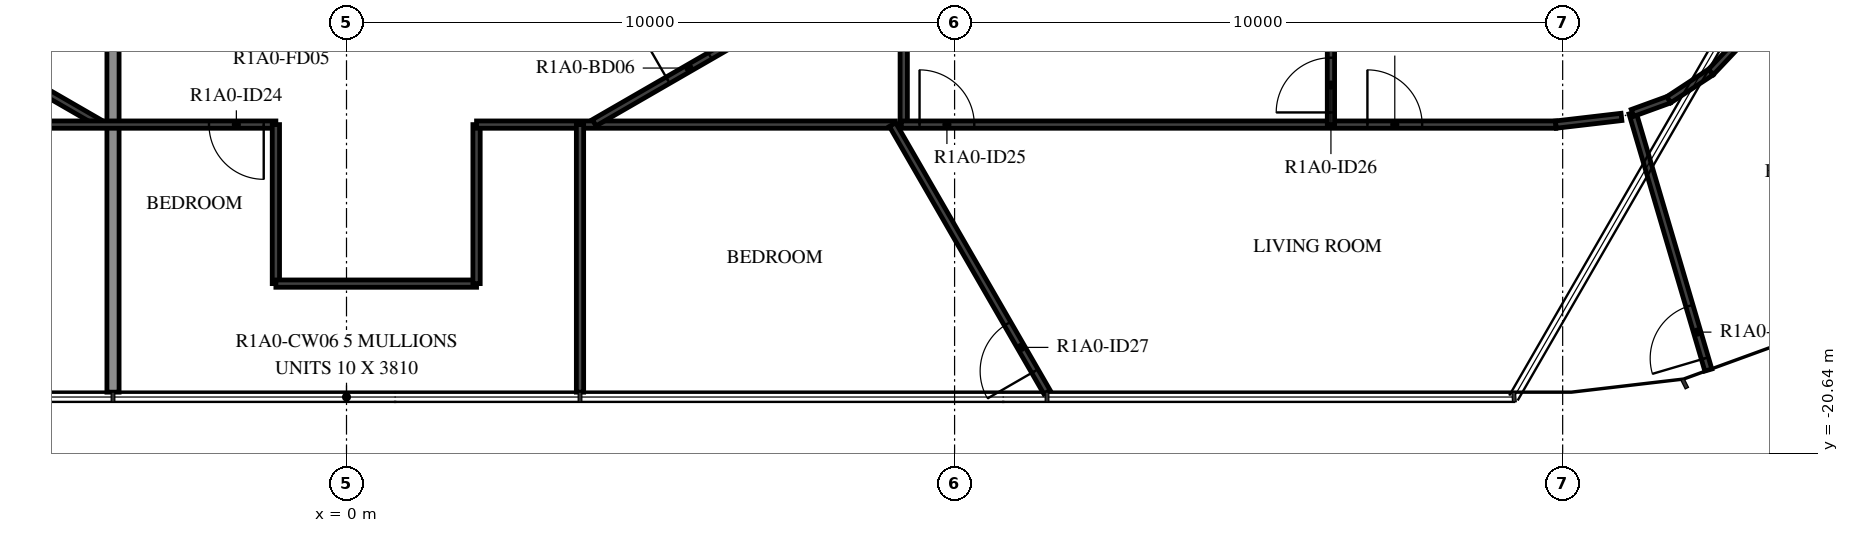
"""IFC4 building model, lengths in metres.
Left out: names, types, materials, properties, quantities, classifications, styles, units other than length and angle.
Written with IfcOpenShell. Run it as: python <this file> out.ifc"""

import sys

from ifc_helpers import new_model, si_unit, direction, frame, frame_2d, origin, place, context, subcontext, project, spatial, rectangle, extrude, element, fill, save


model = new_model("IFC4")
c1 = context("Model", 3, precision=1e-05, world=origin(), true_north=direction((0.0, 1.0)))
c2 = subcontext(c1, "Body", "Model", "MODEL_VIEW")
j1 = project(units=[si_unit("LENGTHUNIT", "METRE"), si_unit("PLANEANGLEUNIT", "RADIAN")], contexts=[c1])
p1 = place(None, origin())
s1 = spatial("IfcSite", under=j1, at=p1, CompositionType="ELEMENT")
p2 = place(p1, origin())
s2 = spatial("IfcBuilding", under=s1, at=p2, CompositionType="ELEMENT")
p3 = place(p2, frame((0.0, 0.0, 38.4)))
s3 = spatial("IfcBuildingStorey", under=s2, at=p3, CompositionType="ELEMENT", Elevation=38.4)
p4 = place(p3, frame((-3.84, -19.63, 0.0), z_axis=(0.0, 0.0, 1.0), x_axis=(0.0, 1.0, 0.0)))
e1 = element("IfcWall", 1, at=p4, inside=s3, PredefinedType="STANDARD", context=c2, shape_type="SweptSolid", body=[
    extrude(rectangle(XDim=6.028, YDim=0.2, at=frame_2d((3.014, 0.0))), origin(), (0.0, 0.0, 1.0), 2.73),
])
p5 = place(p3, frame((27.025, -15.603, 0.0), z_axis=(0.0, 0.0, 1.0), x_axis=(-0.866030653443, 0.499990907215, 0.0)))
e2 = element("IfcWall", 2, at=p5, inside=s3, PredefinedType="STANDARD", context=c2, shape_type="SweptSolid", body=[
    extrude(rectangle(XDim=6.271, YDim=0.2, at=frame_2d((3.136, 0.0))), origin(), (0.0, 0.0, 1.0), 3.12),
])
p6 = place(p3, frame((-11.127, -11.127, 0.0), z_axis=(0.0, 0.0, 1.0), x_axis=(0.866032360344, -0.499987950692, 0.0)))
e3 = element("IfcWall", 3, at=p6, inside=s3, PredefinedType="PARTITIONING", context=c2, shape_type="SweptSolid", body=[
    extrude(rectangle(XDim=8.146, YDim=0.12, at=frame_2d((4.073, 0.0))), origin(), (0.0, 0.0, 1.0), 3.12),
])
p7 = place(p6, frame((1.357, 0.0, 0.0)))
e4 = element("IfcOpeningElement", 4, at=p7, cuts=e3, PredefinedType="OPENING", context=c2, shape_type="SweptSolid", body=[
    extrude(rectangle(XDim=0.8, YDim=2.1, at=frame_2d((0.4, 1.05))), frame((0.0, 0.07, 0.0), z_axis=(0.0, -1.0, 0.0), x_axis=(1.0, 0.0, 0.0)), (0.0, 0.0, 1.0), 0.14),
])
p8 = place(p3, frame((-1.161, -15.23, 0.0), z_axis=(0.0, 0.0, 1.0), x_axis=(-1.0, 0.0, 0.0)))
e5 = element("IfcWall", 5, at=p8, inside=s3, PredefinedType="PARTITIONING", context=c2, shape_type="SweptSolid", body=[
    extrude(rectangle(XDim=18.726, YDim=0.12, at=frame_2d((9.363, 0.0))), origin(), (0.0, 0.0, 1.0), 3.12),
])
p9 = place(p8, frame((9.297, 0.0, 0.0)))
e6 = element("IfcOpeningElement", 6, at=p9, cuts=e5, PredefinedType="OPENING", context=c2, shape_type="SweptSolid", body=[
    extrude(rectangle(XDim=0.9, YDim=2.1, at=frame_2d((0.45, 1.05))), frame((0.0, 0.07, 0.0), z_axis=(0.0, -1.0, 0.0), x_axis=(1.0, 0.0, 0.0)), (0.0, 0.0, 1.0), 0.14),
])
p10 = place(p8, frame((15.755, 0.0, 0.0)))
e7 = element("IfcOpeningElement", 7, at=p10, cuts=e5, PredefinedType="OPENING", context=c2, shape_type="SweptSolid", body=[
    extrude(rectangle(XDim=0.9, YDim=2.1, at=frame_2d((0.45, 1.05))), frame((0.0, 0.07, 0.0), z_axis=(0.0, -1.0, 0.0), x_axis=(1.0, 0.0, 0.0)), (0.0, 0.0, 1.0), 0.14),
])
p11 = place(p8, frame((0.2, 0.0, 0.0)))
e8 = element("IfcOpeningElement", 8, at=p11, cuts=e5, PredefinedType="OPENING", context=c2, shape_type="SweptSolid", body=[
    extrude(rectangle(XDim=0.9, YDim=2.1, at=frame_2d((0.45, 1.05))), frame((0.0, 0.07, 0.0), z_axis=(0.0, -1.0, 0.0), x_axis=(1.0, 0.0, 0.0)), (0.0, 0.0, 1.0), 0.14),
])
p12 = place(p3, frame((-1.161, -15.23, 0.0), z_axis=(0.0, 0.0, 1.0), x_axis=(0.0, -1.0, 0.0)))
e9 = element("IfcWall", 9, at=p12, inside=s3, PredefinedType="PARTITIONING", context=c2, shape_type="SweptSolid", body=[
    extrude(rectangle(XDim=2.615, YDim=0.12, at=frame_2d((1.308, 0.0))), origin(), (0.0, 0.0, 1.0), 3.12),
])
p13 = place(p3, frame((-1.161, -17.845, 0.0), z_axis=(0.0, 0.0, 1.0), x_axis=(1.0, 0.0, 0.0)))
e10 = element("IfcWall", 10, at=p13, inside=s3, PredefinedType="PARTITIONING", context=c2, shape_type="SweptSolid", body=[
    extrude(rectangle(XDim=3.3, YDim=0.12, at=frame_2d((1.65, 0.0))), origin(), (0.0, 0.0, 1.0), 3.12),
])
p14 = place(p3, frame((2.139, -17.845, 0.0), z_axis=(0.0, 0.0, 1.0), x_axis=(0.0, 1.0, 0.0)))
e11 = element("IfcWall", 11, at=p14, inside=s3, PredefinedType="PARTITIONING", context=c2, shape_type="SweptSolid", body=[
    extrude(rectangle(XDim=2.615, YDim=0.12, at=frame_2d((1.308, 0.0))), origin(), (0.0, 0.0, 1.0), 3.12),
])
p15 = place(p3, frame((2.139, -15.23, 0.0), z_axis=(0.0, 0.0, 1.0), x_axis=(1.0, 0.0, 0.0)))
e12 = element("IfcWall", 12, at=p15, inside=s3, PredefinedType="PARTITIONING", context=c2, shape_type="SweptSolid", body=[
    extrude(rectangle(XDim=6.887, YDim=0.12, at=frame_2d((3.444, 0.0))), origin(), (0.0, 0.0, 1.0), 3.12),
])
p16 = place(p3, frame((4.073, -15.2, 0.0), z_axis=(0.0, 0.0, 1.0), x_axis=(0.866034128446, 0.499984888139, 0.0)))
e13 = element("IfcWall", 13, at=p16, inside=s3, PredefinedType="PARTITIONING", context=c2, shape_type="SweptSolid", body=[
    extrude(rectangle(XDim=5.879, YDim=0.12, at=frame_2d((2.939, 0.0))), origin(), (0.0, 0.0, 1.0), 3.12),
])
p17 = place(p16, frame((1.4, 0.0, 0.0)))
e14 = element("IfcOpeningElement", 14, at=p17, cuts=e13, PredefinedType="OPENING", context=c2, shape_type="SweptSolid", body=[
    extrude(rectangle(XDim=0.8, YDim=2.1, at=frame_2d((0.4, 1.05))), frame((0.0, 0.07, 0.0), z_axis=(0.0, -1.0, 0.0), x_axis=(1.0, 0.0, 0.0)), (0.0, 0.0, 1.0), 0.14),
])
p18 = place(p3, frame((9.164, -12.261, 0.0), z_axis=(0.0, 0.0, 1.0), x_axis=(0.0, -1.0, 0.0)))
e15 = element("IfcWall", 15, at=p18, inside=s3, PredefinedType="PARTITIONING", context=c2, shape_type="SweptSolid", body=[
    extrude(rectangle(XDim=2.969, YDim=0.12, at=frame_2d((1.485, 0.0))), origin(), (0.0, 0.0, 1.0), 3.12),
])
p19 = place(p3, frame((9.124, -15.23, 0.0), z_axis=(0.0, 0.0, 1.0), x_axis=(1.0, 0.0, 0.0)))
e16 = element("IfcWall", 16, at=p19, inside=s3, PredefinedType="PARTITIONING", context=c2, shape_type="SweptSolid", body=[
    extrude(rectangle(XDim=10.764, YDim=0.12, at=frame_2d((5.382, 0.0))), origin(), (0.0, 0.0, 1.0), 3.12),
])
p20 = place(p19, frame((0.3, 0.0, 0.0)))
e17 = element("IfcOpeningElement", 17, at=p20, cuts=e16, PredefinedType="OPENING", context=c2, shape_type="SweptSolid", body=[
    extrude(rectangle(XDim=0.9, YDim=2.1, at=frame_2d((0.45, 1.05))), frame((0.0, 0.07, 0.0), z_axis=(0.0, -1.0, 0.0), x_axis=(1.0, 0.0, 0.0)), (0.0, 0.0, 1.0), 0.14),
])
p21 = place(p19, frame((7.665, 0.0, 0.0)))
e18 = element("IfcOpeningElement", 18, at=p21, cuts=e16, PredefinedType="OPENING", context=c2, shape_type="SweptSolid", body=[
    extrude(rectangle(XDim=0.9, YDim=2.1, at=frame_2d((0.45, 1.05))), frame((0.0, 0.07, 0.0), z_axis=(0.0, -1.0, 0.0), x_axis=(1.0, 0.0, 0.0)), (0.0, 0.0, 1.0), 0.14),
])
p22 = place(p3, frame((16.189, -15.23, 0.0), z_axis=(0.0, 0.0, 1.0), x_axis=(0.0, 1.0, 0.0)))
e19 = element("IfcWall", 19, at=p22, inside=s3, PredefinedType="PARTITIONING", context=c2, shape_type="SweptSolid", body=[
    extrude(rectangle(XDim=5.883, YDim=0.12, at=frame_2d((2.942, 0.0))), origin(), (0.0, 0.0, 1.0), 3.12),
])
p23 = place(p22, frame((0.2, 0.0, 0.0)))
e20 = element("IfcOpeningElement", 20, at=p23, cuts=e19, PredefinedType="OPENING", context=c2, shape_type="SweptSolid", body=[
    extrude(rectangle(XDim=0.9, YDim=2.1, at=frame_2d((0.45, 1.05))), frame((0.0, 0.07, 0.0), z_axis=(0.0, -1.0, 0.0), x_axis=(1.0, 0.0, 0.0)), (0.0, 0.0, 1.0), 0.14),
])
p24 = place(p3, frame((3.84, -19.63, 0.0), z_axis=(0.0, 0.0, 1.0), x_axis=(0.0, 1.0, 0.0)))
e21 = element("IfcWall", 21, at=p24, inside=s3, PredefinedType="PARTITIONING", context=c2, shape_type="SweptSolid", body=[
    extrude(rectangle(XDim=4.4, YDim=0.12, at=frame_2d((2.2, 0.0))), origin(), (0.0, 0.0, 1.0), 2.73),
])
p25 = place(p3, frame((11.52, -19.63, 0.0), z_axis=(0.0, 0.0, 1.0), x_axis=(-0.499999763888, 0.866025540104, 0.0)))
e22 = element("IfcWall", 22, at=p25, inside=s3, PredefinedType="PARTITIONING", context=c2, shape_type="SweptSolid", body=[
    extrude(rectangle(XDim=5.081, YDim=0.12, at=frame_2d((2.54, 0.0))), origin(), (0.0, 0.0, 1.0), 3.12),
])
p26 = place(p25, frame((0.4, 0.0, 0.0)))
e23 = element("IfcOpeningElement", 23, at=p26, cuts=e22, PredefinedType="OPENING", context=c2, shape_type="SweptSolid", body=[
    extrude(rectangle(XDim=0.9, YDim=2.1, at=frame_2d((0.45, 1.05))), frame((0.0, 0.07, 0.0), z_axis=(0.0, -1.0, 0.0), x_axis=(1.0, 0.0, 0.0)), (0.0, 0.0, 1.0), 0.14),
])
p27 = place(p3, frame((20.967, -15.104, 0.0), z_axis=(0.0, 0.0, 1.0), x_axis=(-0.993231641151, -0.116150363826, 0.0)))
e24 = element("IfcWall", 24, at=p27, inside=s3, PredefinedType="PARTITIONING", context=c2, shape_type="SweptSolid", body=[
    extrude(rectangle(XDim=1.087, YDim=0.12, at=frame_2d((0.543, 0.0))), origin(), (0.0, 0.0, 1.0), 3.12),
])
p28 = place(p3, frame((22.396, -19.266, 0.0), z_axis=(0.0, 0.0, 1.0), x_axis=(-0.282873823334, 0.959157130022, 0.0)))
e25 = element("IfcWall", 25, at=p28, inside=s3, PredefinedType="PARTITIONING", context=c2, shape_type="SweptSolid", body=[
    extrude(rectangle(XDim=4.409, YDim=0.12, at=frame_2d((2.204, 0.0))), origin(), (0.0, 0.0, 1.0), 3.12),
])
p29 = place(p28, frame((0.2, 0.0, 0.0)))
e26 = element("IfcOpeningElement", 26, at=p29, cuts=e25, PredefinedType="OPENING", context=c2, shape_type="SweptSolid", body=[
    extrude(rectangle(XDim=0.9, YDim=2.1, at=frame_2d((0.45, 1.05))), frame((0.0, 0.07, 0.0), z_axis=(0.0, -1.0, 0.0), x_axis=(1.0, 0.0, 0.0)), (0.0, 0.0, 1.0), 0.14),
])
p30 = place(p3, frame((21.149, -15.038, 0.0), z_axis=(0.0, 0.0, 1.0), x_axis=(0.939726102094, 0.341928140173, 0.0)))
e27 = element("IfcWall", 27, at=p30, inside=s3, PredefinedType="PARTITIONING", context=c2, shape_type="SweptSolid", body=[
    extrude(rectangle(XDim=0.635, YDim=0.12, at=frame_2d((0.318, 0.0))), origin(), (0.0, 0.0, 1.0), 3.12),
])
p31 = place(p3, frame((21.746, -14.82, 0.0), z_axis=(0.0, 0.0, 1.0), x_axis=(0.835477570013, 0.549524549046, 0.0)))
e28 = element("IfcWall", 28, at=p31, inside=s3, PredefinedType="PARTITIONING", context=c2, shape_type="SweptSolid", body=[
    extrude(rectangle(XDim=0.829, YDim=0.12, at=frame_2d((0.415, 0.0))), origin(), (0.0, 0.0, 1.0), 3.12),
])
p32 = place(p3, frame((22.438, -14.365, 0.0), z_axis=(0.0, 0.0, 1.0), x_axis=(0.686182189596, 0.727429723535, 0.0)))
e29 = element("IfcWall", 29, at=p32, inside=s3, PredefinedType="PARTITIONING", context=c2, shape_type="SweptSolid", body=[
    extrude(rectangle(XDim=0.829, YDim=0.12, at=frame_2d((0.414, 0.0))), origin(), (0.0, 0.0, 1.0), 3.12),
])
p33 = place(p11, origin())
e30 = element("IfcDoor", 30, at=p33, inside=s3, OperationType="SINGLE_SWING_LEFT", PredefinedType="DOOR", context=c2, shape_type="SweptSolid", body=[
    extrude(rectangle(XDim=0.9, YDim=2.1, at=frame_2d((0.45, 1.05))), frame((0.0, 0.025, 0.0), z_axis=(0.0, -1.0, 0.0), x_axis=(1.0, 0.0, 0.0)), (0.0, 0.0, 1.0), 0.05),
])
fill(e8, e30)
p34 = place(p17, origin())
e31 = element("IfcDoor", 31, at=p34, inside=s3, OperationType="SINGLE_SWING_RIGHT", PredefinedType="DOOR", context=c2, shape_type="SweptSolid", body=[
    extrude(rectangle(XDim=0.8, YDim=2.1, at=frame_2d((0.4, 1.05))), frame((0.0, 0.025, 0.0), z_axis=(0.0, -1.0, 0.0), x_axis=(1.0, 0.0, 0.0)), (0.0, 0.0, 1.0), 0.05),
])
fill(e14, e31)
p35 = place(p20, origin())
e32 = element("IfcDoor", 32, at=p35, inside=s3, OperationType="SINGLE_SWING_RIGHT", PredefinedType="DOOR", context=c2, shape_type="SweptSolid", body=[
    extrude(rectangle(XDim=0.9, YDim=2.1, at=frame_2d((0.45, 1.05))), frame((0.0, 0.025, 0.0), z_axis=(0.0, -1.0, 0.0), x_axis=(1.0, 0.0, 0.0)), (0.0, 0.0, 1.0), 0.05),
])
fill(e17, e32)
p36 = place(p23, origin())
e33 = element("IfcDoor", 33, at=p36, inside=s3, OperationType="SINGLE_SWING_RIGHT", PredefinedType="DOOR", context=c2, shape_type="SweptSolid", body=[
    extrude(rectangle(XDim=0.9, YDim=2.1, at=frame_2d((0.45, 1.05))), frame((0.0, 0.025, 0.0), z_axis=(0.0, -1.0, 0.0), x_axis=(1.0, 0.0, 0.0)), (0.0, 0.0, 1.0), 0.05),
])
fill(e20, e33)
p37 = place(p26, origin())
e34 = element("IfcDoor", 34, at=p37, inside=s3, OperationType="SINGLE_SWING_LEFT", PredefinedType="DOOR", context=c2, shape_type="SweptSolid", body=[
    extrude(rectangle(XDim=0.9, YDim=2.1, at=frame_2d((0.45, 1.05))), frame((0.0, 0.025, 0.0), z_axis=(0.0, -1.0, 0.0), x_axis=(1.0, 0.0, 0.0)), (0.0, 0.0, 1.0), 0.05),
])
fill(e23, e34)
p38 = place(p29, origin())
e35 = element("IfcDoor", 35, at=p38, inside=s3, OperationType="SINGLE_SWING_RIGHT", PredefinedType="DOOR", context=c2, shape_type="SweptSolid", body=[
    extrude(rectangle(XDim=0.9, YDim=2.1, at=frame_2d((0.45, 1.05))), frame((0.0, 0.025, 0.0), z_axis=(0.0, -1.0, 0.0), x_axis=(1.0, 0.0, 0.0)), (0.0, 0.0, 1.0), 0.05),
])
fill(e26, e35)
p39 = place(p21, origin())
e36 = element("IfcDoor", 36, at=p39, inside=s3, OperationType="SINGLE_SWING_LEFT", PredefinedType="DOOR", context=c2, shape_type="SweptSolid", body=[
    extrude(rectangle(XDim=0.9, YDim=2.1, at=frame_2d((0.45, 1.05))), frame((0.0, 0.025, 0.0), z_axis=(0.0, -1.0, 0.0), x_axis=(1.0, 0.0, 0.0)), (0.0, 0.0, 1.0), 0.05),
])
fill(e18, e36)
save(model, sys.argv[1])
